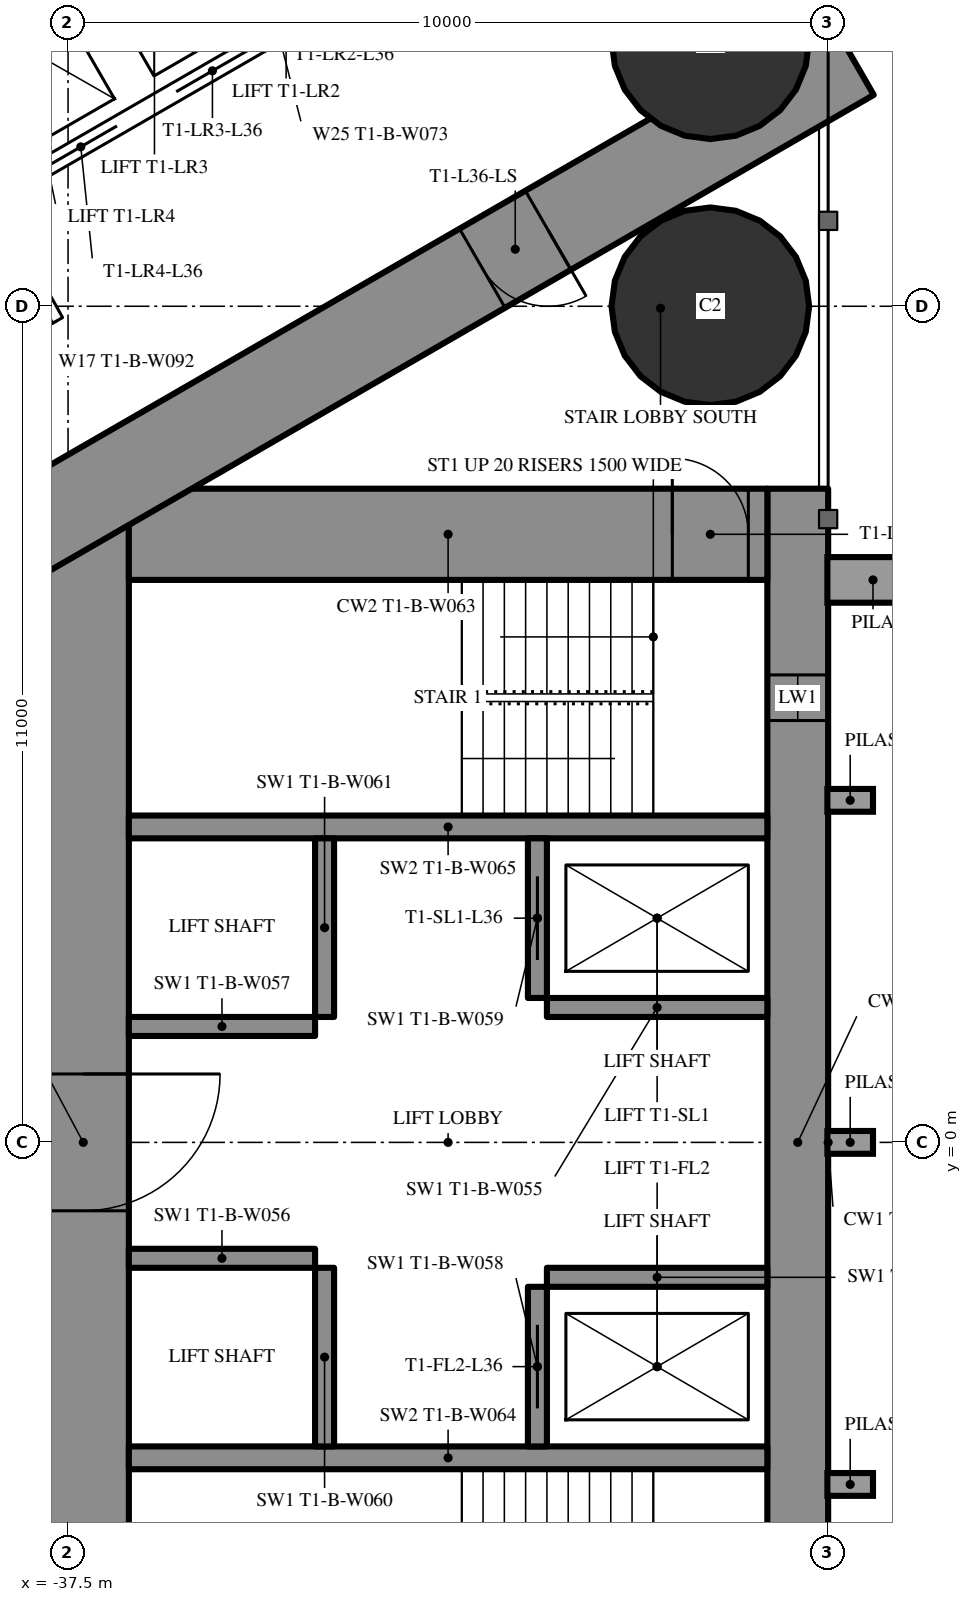
"""IFC4 building model, lengths in metres.
Left out: names, types, materials, properties, quantities, classifications, styles, units other than length and angle.
Written with IfcOpenShell. Run it as: python <this file> out.ifc"""

import sys

from ifc_helpers import new_model, si_unit, direction, frame, frame_2d, origin, origin_2d, place, context, subcontext, project, spatial, rectangle, hollow_circle, extrude, element, fill, save


model = new_model("IFC4")
c1 = context("Model", 3, precision=1e-05, world=origin(), true_north=direction((0.0, 1.0)))
c2 = subcontext(c1, "Body", "Model", "MODEL_VIEW")
j1 = project(units=[si_unit("LENGTHUNIT", "METRE"), si_unit("PLANEANGLEUNIT", "RADIAN")], contexts=[c1])
p1 = place(None, origin())
s1 = spatial("IfcSite", under=j1, at=p1, CompositionType="ELEMENT")
p2 = place(p1, origin())
s2 = spatial("IfcBuilding", under=s1, at=p2, CompositionType="ELEMENT")
p3 = place(p2, frame((0.0, 0.0, 136.1)))
s3 = spatial("IfcBuildingStorey", under=s2, at=p3, CompositionType="ELEMENT", Elevation=136.1)
for number, where, z_axis, x_axis in (
    (1, (-29.05, 11.0, 0.0), (0.0, 0.0, 1.0), (1.0, 0.0, 0.0)),
    (2, (-29.05, 14.5, 0.0), (0.0, 0.0, 1.0), (1.0, 0.0, 0.0)),
):
    element("IfcColumn", number, at=place(p3, frame(where, z_axis=z_axis, x_axis=x_axis)), inside=s3, PredefinedType="COLUMN", context=c2, shape_type="SweptSolid", body=[
        extrude(hollow_circle(Radius=1.3, WallThickness=0.1, at=origin_2d()), origin(), (0.0, 0.0, 1.0), 3.5),
    ])
p4 = place(p3, frame((-27.9, 8.6, 0.0), z_axis=(0.0, 0.0, 1.0), x_axis=(0.0, -1.0, 0.0)))
e3 = element("IfcWall", 3, at=p4, inside=s3, PredefinedType="SHEAR", context=c2, shape_type="SweptSolid", body=[
    extrude(rectangle(XDim=17.2, YDim=0.8, at=frame_2d((8.6, 0.0))), origin(), (0.0, 0.0, 1.0), 3.5),
])
p5 = place(p4, frame((2.45, 0.0, 0.6)))
e4 = element("IfcOpeningElement", 4, at=p5, cuts=e3, PredefinedType="OPENING", context=c2, shape_type="SweptSolid", body=[
    extrude(rectangle(XDim=0.6, YDim=2.1, at=frame_2d((0.3, 1.05))), frame((0.0, 0.41, 0.0), z_axis=(0.0, -1.0, 0.0), x_axis=(1.0, 0.0, 0.0)), (0.0, 0.0, 1.0), 0.82),
])
p6 = place(p4, frame((14.15, 0.0, 0.6)))
e5 = element("IfcOpeningElement", 5, at=p6, cuts=e3, PredefinedType="OPENING", context=c2, shape_type="SweptSolid", body=[
    extrude(rectangle(XDim=0.6, YDim=2.1, at=frame_2d((0.3, 1.05))), frame((0.0, 0.41, 0.0), z_axis=(0.0, -1.0, 0.0), x_axis=(1.0, 0.0, 0.0)), (0.0, 0.0, 1.0), 0.82),
])
p7 = place(p3, frame((-37.3, 8.6, 0.0), z_axis=(0.0, 0.0, 1.0), x_axis=(0.0, -1.0, 0.0)))
e6 = element("IfcWall", 6, at=p7, inside=s3, PredefinedType="SHEAR", context=c2, shape_type="SweptSolid", body=[
    extrude(rectangle(XDim=17.2, YDim=1.2, at=frame_2d((8.6, 0.0))), origin(), (0.0, 0.0, 1.0), 3.5),
])
p8 = place(p7, frame((7.7, 0.0, 0.0)))
e7 = element("IfcOpeningElement", 7, at=p8, cuts=e6, PredefinedType="OPENING", context=c2, shape_type="SweptSolid", body=[
    extrude(rectangle(XDim=1.8, YDim=2.2, at=frame_2d((0.9, 1.1))), frame((0.0, 0.61, 0.0), z_axis=(0.0, -1.0, 0.0), x_axis=(1.0, 0.0, 0.0)), (0.0, 0.0, 1.0), 1.22),
])
p9 = place(p3, frame((-28.3, 8.0, 0.0), z_axis=(0.0, 0.0, 1.0), x_axis=(-1.0, 0.0, 0.0)))
e8 = element("IfcWall", 8, at=p9, inside=s3, PredefinedType="SHEAR", context=c2, shape_type="SweptSolid", body=[
    extrude(rectangle(XDim=8.4, YDim=1.2, at=frame_2d((4.2, 0.0))), origin(), (0.0, 0.0, 1.0), 3.5),
])
p10 = place(p9, frame((0.25, 0.0, 0.0)))
e9 = element("IfcOpeningElement", 9, at=p10, cuts=e8, PredefinedType="OPENING", context=c2, shape_type="SweptSolid", body=[
    extrude(rectangle(XDim=1.0, YDim=2.2, at=frame_2d((0.5, 1.1))), frame((0.0, 0.61, 0.0), z_axis=(0.0, -1.0, 0.0), x_axis=(1.0, 0.0, 0.0)), (0.0, 0.0, 1.0), 1.22),
])
for number, where, z_axis, x_axis in (
    (10, (-28.3, 4.15, 0.0), (0.0, 0.0, 1.0), (-1.0, 0.0, 0.0)),
    (11, (-28.3, -4.15, 0.0), (0.0, 0.0, 1.0), (-1.0, 0.0, 0.0)),
):
    element("IfcWall", number, at=place(p3, frame(where, z_axis=z_axis, x_axis=x_axis)), inside=s3, PredefinedType="SHEAR", context=c2, shape_type="SweptSolid", body=[
        extrude(rectangle(XDim=8.4, YDim=0.3, at=frame_2d((4.2, 0.0))), origin(), (0.0, 0.0, 1.0), 3.5),
    ])
p11 = place(p3, frame((-31.325, 4.0, 0.0), z_axis=(0.0, 0.0, 1.0), x_axis=(0.0, -1.0, 0.0)))
e12 = element("IfcWall", 12, at=p11, inside=s3, PredefinedType="SHEAR", context=c2, shape_type="SweptSolid", body=[
    extrude(rectangle(XDim=2.1, YDim=0.25, at=frame_2d((1.05, 0.0))), origin(), (0.0, 0.0, 1.0), 3.5),
])
p12 = place(p11, frame((0.5, 0.0, 0.0)))
e13 = element("IfcOpeningElement", 13, at=p12, cuts=e12, PredefinedType="OPENING", context=c2, shape_type="SweptSolid", body=[
    extrude(rectangle(XDim=1.1, YDim=2.2, at=frame_2d((0.55, 1.1))), frame((0.0, 0.135, 0.0), z_axis=(0.0, -1.0, 0.0), x_axis=(1.0, 0.0, 0.0)), (0.0, 0.0, 1.0), 0.27),
])
p13 = place(p3, frame((-34.125, 4.0, 0.0), z_axis=(0.0, 0.0, 1.0), x_axis=(0.0, -1.0, 0.0)))
e14 = element("IfcWall", 14, at=p13, inside=s3, PredefinedType="SHEAR", context=c2, shape_type="SweptSolid", body=[
    extrude(rectangle(XDim=2.35, YDim=0.25, at=frame_2d((1.175, 0.0))), origin(), (0.0, 0.0, 1.0), 3.5),
])
p14 = place(p3, frame((-28.3, 1.775, 0.0), z_axis=(0.0, 0.0, 1.0), x_axis=(-1.0, 0.0, 0.0)))
e15 = element("IfcWall", 15, at=p14, inside=s3, PredefinedType="SHEAR", context=c2, shape_type="SweptSolid", body=[
    extrude(rectangle(XDim=2.9, YDim=0.25, at=frame_2d((1.45, 0.0))), origin(), (0.0, 0.0, 1.0), 3.5),
])
p15 = place(p3, frame((-34.25, 1.525, 0.0), z_axis=(0.0, 0.0, 1.0), x_axis=(-1.0, 0.0, 0.0)))
e16 = element("IfcWall", 16, at=p15, inside=s3, PredefinedType="SHEAR", context=c2, shape_type="SweptSolid", body=[
    extrude(rectangle(XDim=2.45, YDim=0.25, at=frame_2d((1.225, 0.0))), origin(), (0.0, 0.0, 1.0), 3.5),
])
p16 = place(p3, frame((-31.325, -1.9, 0.0), z_axis=(0.0, 0.0, 1.0), x_axis=(0.0, -1.0, 0.0)))
e17 = element("IfcWall", 17, at=p16, inside=s3, PredefinedType="SHEAR", context=c2, shape_type="SweptSolid", body=[
    extrude(rectangle(XDim=2.1, YDim=0.25, at=frame_2d((1.05, 0.0))), origin(), (0.0, 0.0, 1.0), 3.5),
])
p17 = place(p16, frame((0.5, 0.0, 0.0)))
e18 = element("IfcOpeningElement", 18, at=p17, cuts=e17, PredefinedType="OPENING", context=c2, shape_type="SweptSolid", body=[
    extrude(rectangle(XDim=1.1, YDim=2.2, at=frame_2d((0.55, 1.1))), frame((0.0, 0.135, 0.0), z_axis=(0.0, -1.0, 0.0), x_axis=(1.0, 0.0, 0.0)), (0.0, 0.0, 1.0), 0.27),
])
p18 = place(p3, frame((-34.125, -1.65, 0.0), z_axis=(0.0, 0.0, 1.0), x_axis=(0.0, -1.0, 0.0)))
e19 = element("IfcWall", 19, at=p18, inside=s3, PredefinedType="SHEAR", context=c2, shape_type="SweptSolid", body=[
    extrude(rectangle(XDim=2.35, YDim=0.25, at=frame_2d((1.175, 0.0))), origin(), (0.0, 0.0, 1.0), 3.5),
])
p19 = place(p3, frame((-28.3, -1.775, 0.0), z_axis=(0.0, 0.0, 1.0), x_axis=(-1.0, 0.0, 0.0)))
e20 = element("IfcWall", 20, at=p19, inside=s3, PredefinedType="SHEAR", context=c2, shape_type="SweptSolid", body=[
    extrude(rectangle(XDim=2.9, YDim=0.25, at=frame_2d((1.45, 0.0))), origin(), (0.0, 0.0, 1.0), 3.5),
])
p20 = place(p3, frame((-34.25, -1.525, 0.0), z_axis=(0.0, 0.0, 1.0), x_axis=(-1.0, 0.0, 0.0)))
e21 = element("IfcWall", 21, at=p20, inside=s3, PredefinedType="SHEAR", context=c2, shape_type="SweptSolid", body=[
    extrude(rectangle(XDim=2.45, YDim=0.25, at=frame_2d((1.225, 0.0))), origin(), (0.0, 0.0, 1.0), 3.5),
])
p21 = place(p3, frame((-27.2, 14.3, 0.0), z_axis=(0.0, 0.0, 1.0), x_axis=(-0.866026593062, -0.499997940104, 0.0)))
e22 = element("IfcWall", 22, at=p21, inside=s3, PredefinedType="SHEAR", context=c2, shape_type="SweptSolid", body=[
    extrude(rectangle(XDim=28.946, YDim=1.2, at=frame_2d((14.473, 0.0))), origin(), (0.0, 0.0, 1.0), 3.5),
])
p22 = place(p21, frame((4.6, 0.0, 0.0)))
e23 = element("IfcOpeningElement", 23, at=p22, cuts=e22, PredefinedType="OPENING", context=c2, shape_type="SweptSolid", body=[
    extrude(rectangle(XDim=1.0, YDim=2.2, at=frame_2d((0.5, 1.1))), frame((0.0, 0.61, 0.0), z_axis=(0.0, -1.0, 0.0), x_axis=(1.0, 0.0, 0.0)), (0.0, 0.0, 1.0), 1.22),
])
p23 = place(p21, frame((13.395, 0.0, 0.0)))
e24 = element("IfcOpeningElement", 24, at=p23, cuts=e22, PredefinedType="OPENING", context=c2, shape_type="SweptSolid", body=[
    extrude(rectangle(XDim=1.8, YDim=2.2, at=frame_2d((0.9, 1.1))), frame((0.0, 0.61, 0.0), z_axis=(0.0, -1.0, 0.0), x_axis=(1.0, 0.0, 0.0)), (0.0, 0.0, 1.0), 1.22),
])
p24 = place(p3, frame((-27.2, -14.3, 0.0), z_axis=(0.0, 0.0, 1.0), x_axis=(-0.866024021859, 0.500002393557, 0.0)))
e25 = element("IfcWall", 25, at=p24, inside=s3, PredefinedType="SHEAR", context=c2, shape_type="SweptSolid", body=[
    extrude(rectangle(XDim=27.907, YDim=1.2, at=frame_2d((13.954, 0.0))), origin(), (0.0, 0.0, 1.0), 3.5),
])
p25 = place(p24, frame((4.6, 0.0, 0.0)))
e26 = element("IfcOpeningElement", 26, at=p25, cuts=e25, PredefinedType="OPENING", context=c2, shape_type="SweptSolid", body=[
    extrude(rectangle(XDim=1.0, YDim=2.2, at=frame_2d((0.5, 1.1))), frame((0.0, 0.61, 0.0), z_axis=(0.0, -1.0, 0.0), x_axis=(1.0, 0.0, 0.0)), (0.0, 0.0, 1.0), 1.22),
])
p26 = place(p24, frame((13.395, 0.0, 0.0)))
e27 = element("IfcOpeningElement", 27, at=p26, cuts=e25, PredefinedType="OPENING", context=c2, shape_type="SweptSolid", body=[
    extrude(rectangle(XDim=1.8, YDim=2.2, at=frame_2d((0.9, 1.1))), frame((0.0, 0.61, 0.0), z_axis=(0.0, -1.0, 0.0), x_axis=(1.0, 0.0, 0.0)), (0.0, 0.0, 1.0), 1.22),
])
p27 = place(p3, frame((-37.7, 10.894, 0.0), z_axis=(0.0, 0.0, 1.0), x_axis=(-0.866027905338, -0.499995667157, 0.0)))
e28 = element("IfcWall", 28, at=p27, inside=s3, PredefinedType="PARTITIONING", context=c2, shape_type="SweptSolid", body=[
    extrude(rectangle(XDim=21.787, YDim=0.2, at=frame_2d((10.894, 0.0))), origin(), (0.0, 0.0, 1.0), 3.25),
])
p28 = place(p27, frame((17.711, 0.0, 0.0)))
e29 = element("IfcOpeningElement", 29, at=p28, cuts=e28, PredefinedType="OPENING", context=c2, shape_type="SweptSolid", body=[
    extrude(rectangle(XDim=0.95, YDim=2.2, at=frame_2d((0.475, 1.1))), frame((0.0, 0.11, 0.0), z_axis=(0.0, -1.0, 0.0), x_axis=(1.0, 0.0, 0.0)), (0.0, 0.0, 1.0), 0.22),
])
p29 = place(p27, frame((19.399, 0.0, 0.0)))
e30 = element("IfcOpeningElement", 30, at=p29, cuts=e28, PredefinedType="OPENING", context=c2, shape_type="SweptSolid", body=[
    extrude(rectangle(XDim=1.8, YDim=2.2, at=frame_2d((0.9, 1.1))), frame((0.0, 0.11, 0.0), z_axis=(0.0, -1.0, 0.0), x_axis=(1.0, 0.0, 0.0)), (0.0, 0.0, 1.0), 0.22),
])
p30 = place(p27, frame((0.6, 0.0, 0.0)))
e31 = element("IfcOpeningElement", 31, at=p30, cuts=e28, PredefinedType="OPENING", context=c2, shape_type="SweptSolid", body=[
    extrude(rectangle(XDim=0.95, YDim=2.2, at=frame_2d((0.475, 1.1))), frame((0.0, 0.11, 0.0), z_axis=(0.0, -1.0, 0.0), x_axis=(1.0, 0.0, 0.0)), (0.0, 0.0, 1.0), 0.22),
])
p31 = place(p3, frame((-38.513, 12.392, 0.0), z_axis=(0.0, 0.0, 1.0), x_axis=(0.485585508183, -0.874189175317, 0.0)))
e32 = element("IfcWall", 32, at=p31, inside=s3, PredefinedType="PARTITIONING", context=c2, shape_type="SweptSolid", body=[
    extrude(rectangle(XDim=1.805, YDim=0.15, at=frame_2d((0.902, 0.0))), origin(), (0.0, 0.0, 1.0), 3.25),
])
p32 = place(p3, frame((-31.01, 16.747, 0.0), z_axis=(0.0, 0.0, 1.0), x_axis=(-0.866028165386, -0.499995216735, 0.0)))
e33 = element("IfcWall", 33, at=p32, inside=s3, PredefinedType="PARTITIONING", context=c2, shape_type="SweptSolid", body=[
    extrude(rectangle(XDim=8.6, YDim=0.25, at=frame_2d((4.3, 0.0))), origin(), (0.0, 0.0, 1.0), 3.25),
])
p33 = place(p32, frame((0.75, 0.0, 0.0)))
e34 = element("IfcOpeningElement", 34, at=p33, cuts=e33, PredefinedType="OPENING", context=c2, shape_type="SweptSolid", body=[
    extrude(rectangle(XDim=1.1, YDim=2.2, at=frame_2d((0.55, 1.1))), frame((0.0, 0.135, 0.0), z_axis=(0.0, -1.0, 0.0), x_axis=(1.0, 0.0, 0.0)), (0.0, 0.0, 1.0), 0.27),
])
p34 = place(p32, frame((2.75, 0.0, 0.0)))
e35 = element("IfcOpeningElement", 35, at=p34, cuts=e33, PredefinedType="OPENING", context=c2, shape_type="SweptSolid", body=[
    extrude(rectangle(XDim=1.1, YDim=2.2, at=frame_2d((0.55, 1.1))), frame((0.0, 0.135, 0.0), z_axis=(0.0, -1.0, 0.0), x_axis=(1.0, 0.0, 0.0)), (0.0, 0.0, 1.0), 0.27),
])
p35 = place(p32, frame((4.75, 0.0, 0.0)))
e36 = element("IfcOpeningElement", 36, at=p35, cuts=e33, PredefinedType="OPENING", context=c2, shape_type="SweptSolid", body=[
    extrude(rectangle(XDim=1.1, YDim=2.2, at=frame_2d((0.55, 1.1))), frame((0.0, 0.135, 0.0), z_axis=(0.0, -1.0, 0.0), x_axis=(1.0, 0.0, 0.0)), (0.0, 0.0, 1.0), 0.27),
])
p36 = place(p32, frame((6.75, 0.0, 0.0)))
e37 = element("IfcOpeningElement", 37, at=p36, cuts=e33, PredefinedType="OPENING", context=c2, shape_type="SweptSolid", body=[
    extrude(rectangle(XDim=1.1, YDim=2.2, at=frame_2d((0.55, 1.1))), frame((0.0, 0.135, 0.0), z_axis=(0.0, -1.0, 0.0), x_axis=(1.0, 0.0, 0.0)), (0.0, 0.0, 1.0), 0.27),
])
p37 = place(p22, origin())
e38 = element("IfcDoor", 38, at=p37, inside=s3, OperationType="SINGLE_SWING_LEFT", PredefinedType="DOOR", context=c2, shape_type="SweptSolid", body=[
    extrude(rectangle(XDim=1.0, YDim=2.2, at=frame_2d((0.5, 1.1))), frame((0.0, 0.025, 0.0), z_axis=(0.0, -1.0, 0.0), x_axis=(1.0, 0.0, 0.0)), (0.0, 0.0, 1.0), 0.05),
])
fill(e23, e38)
p38 = place(p8, origin())
e39 = element("IfcDoor", 39, at=p38, inside=s3, OperationType="DOUBLE_DOOR_SINGLE_SWING", PredefinedType="DOOR", context=c2, shape_type="SweptSolid", body=[
    extrude(rectangle(XDim=1.8, YDim=2.2, at=frame_2d((0.9, 1.1))), frame((0.0, 0.025, 0.0), z_axis=(0.0, -1.0, 0.0), x_axis=(1.0, 0.0, 0.0)), (0.0, 0.0, 1.0), 0.05),
])
fill(e7, e39)
p39 = place(p10, origin())
e40 = element("IfcDoor", 40, at=p39, inside=s3, OperationType="SINGLE_SWING_RIGHT", PredefinedType="DOOR", context=c2, shape_type="SweptSolid", body=[
    extrude(rectangle(XDim=1.0, YDim=2.2, at=frame_2d((0.5, 1.1))), frame((0.0, 0.025, 0.0), z_axis=(0.0, -1.0, 0.0), x_axis=(1.0, 0.0, 0.0)), (0.0, 0.0, 1.0), 0.05),
])
fill(e9, e40)
p40 = place(p12, origin())
e41 = element("IfcDoor", 41, at=p40, inside=s3, OperationType="SLIDING_TO_LEFT", PredefinedType="USERDEFINED", context=c2, shape_type="SweptSolid", body=[
    extrude(rectangle(XDim=1.1, YDim=2.2, at=frame_2d((0.55, 1.1))), frame((0.0, 0.025, 0.0), z_axis=(0.0, -1.0, 0.0), x_axis=(1.0, 0.0, 0.0)), (0.0, 0.0, 1.0), 0.05),
])
fill(e13, e41)
p41 = place(p17, origin())
e42 = element("IfcDoor", 42, at=p41, inside=s3, OperationType="SLIDING_TO_LEFT", PredefinedType="USERDEFINED", context=c2, shape_type="SweptSolid", body=[
    extrude(rectangle(XDim=1.1, YDim=2.2, at=frame_2d((0.55, 1.1))), frame((0.0, 0.025, 0.0), z_axis=(0.0, -1.0, 0.0), x_axis=(1.0, 0.0, 0.0)), (0.0, 0.0, 1.0), 0.05),
])
fill(e18, e42)
p42 = place(p35, origin())
e43 = element("IfcDoor", 43, at=p42, inside=s3, OperationType="DOUBLE_DOOR_SLIDING", PredefinedType="USERDEFINED", context=c2, shape_type="SweptSolid", body=[
    extrude(rectangle(XDim=1.1, YDim=2.2, at=frame_2d((0.55, 1.1))), frame((0.0, 0.025, 0.0), z_axis=(0.0, -1.0, 0.0), x_axis=(1.0, 0.0, 0.0)), (0.0, 0.0, 1.0), 0.05),
])
fill(e36, e43)
p43 = place(p36, origin())
e44 = element("IfcDoor", 44, at=p43, inside=s3, OperationType="DOUBLE_DOOR_SLIDING", PredefinedType="USERDEFINED", context=c2, shape_type="SweptSolid", body=[
    extrude(rectangle(XDim=1.1, YDim=2.2, at=frame_2d((0.55, 1.1))), frame((0.0, 0.025, 0.0), z_axis=(0.0, -1.0, 0.0), x_axis=(1.0, 0.0, 0.0)), (0.0, 0.0, 1.0), 0.05),
])
fill(e37, e44)
p44 = place(p5, origin())
e45 = element("IfcWindow", 45, at=p44, inside=s3, PartitioningType="SINGLE_PANEL", PredefinedType="WINDOW", context=c2, shape_type="SweptSolid", body=[
    extrude(rectangle(XDim=0.6, YDim=2.1, at=frame_2d((0.3, 1.05))), frame((0.0, 0.03, 0.0), z_axis=(0.0, -1.0, 0.0), x_axis=(1.0, 0.0, 0.0)), (0.0, 0.0, 1.0), 0.06),
])
fill(e4, e45)
save(model, sys.argv[1])
